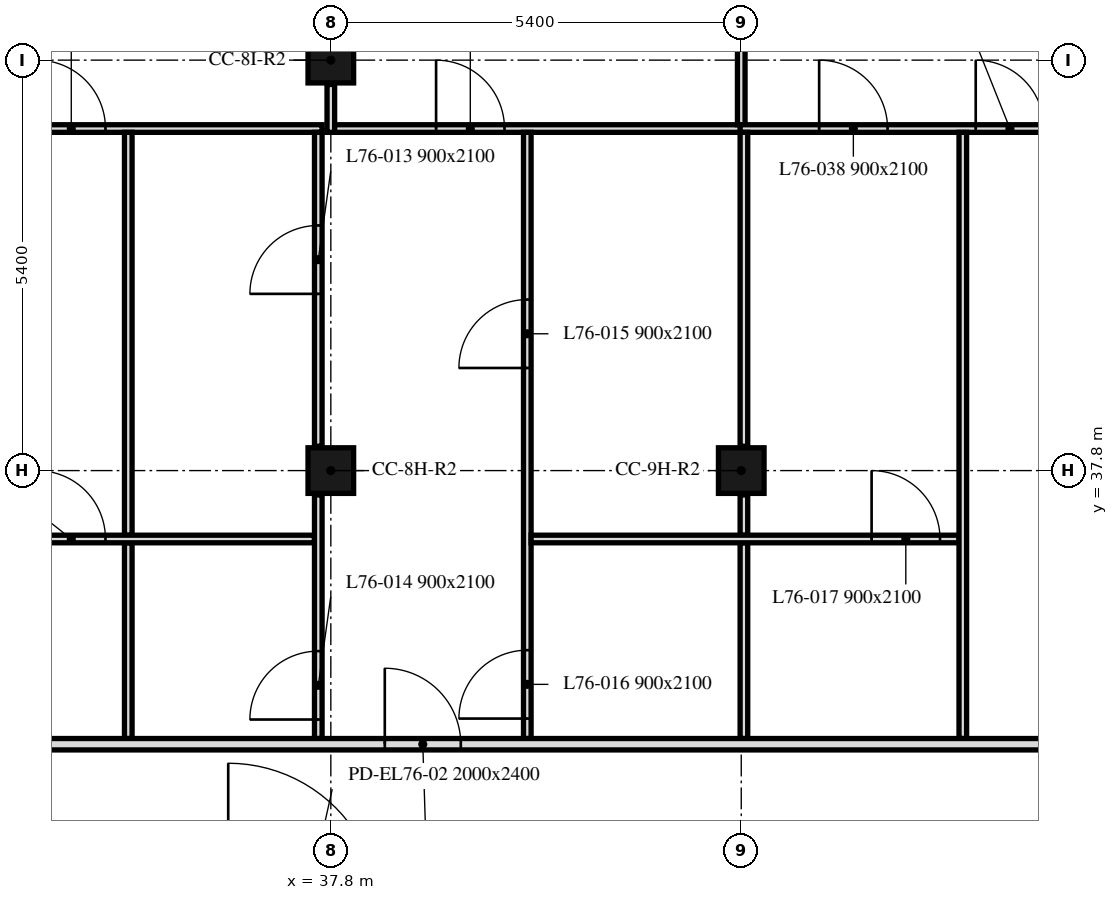
"""IFC4 building model, lengths in metres.
Left out: names, types, materials, properties, quantities, classifications, styles, units other than length and angle.
Written with IfcOpenShell. Run it as: python <this file> out.ifc"""

import sys

from ifc_helpers import new_model, si_unit, direction, frame, frame_2d, origin, origin_2d, place, context, subcontext, project, spatial, rectangle, extrude, element, fill, save


model = new_model("IFC4")
c1 = context("Model", 3, precision=1e-05, world=origin(), true_north=direction((0.0, 1.0)))
c2 = subcontext(c1, "Body", "Model", "MODEL_VIEW")
j1 = project(units=[si_unit("LENGTHUNIT", "METRE"), si_unit("PLANEANGLEUNIT", "RADIAN")], contexts=[c1])
p1 = place(None, origin())
s1 = spatial("IfcSite", under=j1, at=p1, CompositionType="ELEMENT")
p2 = place(p1, origin())
s2 = spatial("IfcBuilding", under=s1, at=p2, CompositionType="ELEMENT")
p3 = place(p2, frame((0.0, 0.0, 304.9)))
s3 = spatial("IfcBuildingStorey", under=s2, at=p3, CompositionType="ELEMENT", Elevation=304.9)
for number, where, z_axis, x_axis in (
    (1, (37.8, 37.8, 0.0), (0.0, 0.0, 1.0), (1.0, 0.0, 0.0)),
    (2, (43.2, 37.8, 0.0), (0.0, 0.0, 1.0), (1.0, 0.0, 0.0)),
    (3, (37.8, 43.2, 0.0), (0.0, 0.0, 1.0), (1.0, 0.0, 0.0)),
):
    element("IfcColumn", number, at=place(p3, frame(where, z_axis=z_axis, x_axis=x_axis)), inside=s3, PredefinedType="COLUMN", context=c2, shape_type="SweptSolid", body=[
        extrude(rectangle(XDim=0.6, YDim=0.6, at=origin_2d()), origin(), (0.0, 0.0, 1.0), 2.8),
    ])
p4 = place(p3, frame((47.901, 43.051, 0.0), z_axis=(0.0, 0.0, 1.0), x_axis=(-0.707106781187, 0.707106781187, 0.0)))
e4 = element("IfcWall", 4, at=p4, inside=s3, PredefinedType="SOLIDWALL", context=c2, shape_type="SweptSolid", body=[
    extrude(rectangle(XDim=6.86, YDim=0.3, at=frame_2d((3.43, 0.0))), origin(), (0.0, 0.0, 1.0), 2.8),
])
p5 = place(p4, frame((1.28, 0.0, 0.9)))
e5 = element("IfcOpeningElement", 5, at=p5, cuts=e4, PredefinedType="OPENING", context=c2, shape_type="SweptSolid", body=[
    extrude(rectangle(XDim=1.1, YDim=1.7, at=frame_2d((0.55, 0.85))), frame((0.0, 0.16, 0.0), z_axis=(0.0, -1.0, 0.0), x_axis=(1.0, 0.0, 0.0)), (0.0, 0.0, 1.0), 0.32),
])
p6 = place(p4, frame((4.48, 0.0, 0.9)))
e6 = element("IfcOpeningElement", 6, at=p6, cuts=e4, PredefinedType="OPENING", context=c2, shape_type="SweptSolid", body=[
    extrude(rectangle(XDim=1.1, YDim=1.7, at=frame_2d((0.55, 0.85))), frame((0.0, 0.16, 0.0), z_axis=(0.0, -1.0, 0.0), x_axis=(1.0, 0.0, 0.0)), (0.0, 0.0, 1.0), 0.32),
])
p7 = place(p3, frame((32.475, 42.3, 0.0), z_axis=(0.0, 0.0, 1.0), x_axis=(1.0, 0.0, 0.0)))
e7 = element("IfcWall", 7, at=p7, inside=s3, PredefinedType="PARTITIONING", context=c2, shape_type="SweptSolid", body=[
    extrude(rectangle(XDim=5.21, YDim=0.1, at=frame_2d((2.605, 0.0))), origin(), (0.0, 0.0, 1.0), 2.8),
])
p8 = place(p7, frame((1.46, 0.0, 0.0)))
e8 = element("IfcOpeningElement", 8, at=p8, cuts=e7, PredefinedType="OPENING", context=c2, shape_type="SweptSolid", body=[
    extrude(rectangle(XDim=0.9, YDim=2.1, at=frame_2d((0.45, 1.05))), frame((0.0, 0.05, 0.0), z_axis=(0.0, -1.0, 0.0), x_axis=(1.0, 0.0, 0.0)), (0.0, 0.0, 1.0), 0.1),
])
p9 = place(p3, frame((37.8, 42.25, 0.0), z_axis=(0.0, 0.0, 1.0), x_axis=(0.0, 1.0, 0.0)))
e9 = element("IfcWall", 9, at=p9, inside=s3, PredefinedType="PARTITIONING", context=c2, shape_type="SweptSolid", body=[
    extrude(rectangle(XDim=0.63, YDim=0.1, at=frame_2d((0.315, 0.0))), origin(), (0.0, 0.0, 1.0), 2.8),
])
p10 = place(p3, frame((37.85, 42.3, 0.0), z_axis=(0.0, 0.0, 1.0), x_axis=(1.0, 0.0, 0.0)))
e10 = element("IfcWall", 10, at=p10, inside=s3, PredefinedType="PARTITIONING", context=c2, shape_type="SweptSolid", body=[
    extrude(rectangle(XDim=5.4, YDim=0.1, at=frame_2d((2.7, 0.0))), origin(), (0.0, 0.0, 1.0), 2.8),
])
p11 = place(p10, frame((1.335, 0.0, 0.0)))
e11 = element("IfcOpeningElement", 11, at=p11, cuts=e10, PredefinedType="OPENING", context=c2, shape_type="SweptSolid", body=[
    extrude(rectangle(XDim=0.9, YDim=2.1, at=frame_2d((0.45, 1.05))), frame((0.0, 0.05, 0.0), z_axis=(0.0, -1.0, 0.0), x_axis=(1.0, 0.0, 0.0)), (0.0, 0.0, 1.0), 0.1),
])
p12 = place(p3, frame((43.2, 42.35, 0.0), z_axis=(0.0, 0.0, 1.0), x_axis=(0.0, 1.0, 0.0)))
e12 = element("IfcWall", 12, at=p12, inside=s3, PredefinedType="PARTITIONING", context=c2, shape_type="SweptSolid", body=[
    extrude(rectangle(XDim=5.138, YDim=0.1, at=frame_2d((2.569, 0.0))), origin(), (0.0, 0.0, 1.0), 2.8),
])
p13 = place(p12, frame((2.65, 0.0, 0.0)))
e13 = element("IfcOpeningElement", 13, at=p13, cuts=e12, PredefinedType="OPENING", context=c2, shape_type="SweptSolid", body=[
    extrude(rectangle(XDim=0.9, YDim=2.1, at=frame_2d((0.45, 1.05))), frame((0.0, 0.05, 0.0), z_axis=(0.0, -1.0, 0.0), x_axis=(1.0, 0.0, 0.0)), (0.0, 0.0, 1.0), 0.1),
])
p14 = place(p3, frame((43.185, 42.3, 0.0), z_axis=(0.0, 0.0, 1.0), x_axis=(1.0, 0.0, 0.0)))
e14 = element("IfcWall", 14, at=p14, inside=s3, PredefinedType="PARTITIONING", context=c2, shape_type="SweptSolid", body=[
    extrude(rectangle(XDim=4.664, YDim=0.1, at=frame_2d((2.332, 0.0))), origin(), (0.0, 0.0, 1.0), 2.8),
])
p15 = place(p14, frame((3.1, 0.0, 0.0)))
e15 = element("IfcOpeningElement", 15, at=p15, cuts=e14, PredefinedType="OPENING", context=c2, shape_type="SweptSolid", body=[
    extrude(rectangle(XDim=0.9, YDim=2.1, at=frame_2d((0.45, 1.05))), frame((0.0, 0.05, 0.0), z_axis=(0.0, -1.0, 0.0), x_axis=(1.0, 0.0, 0.0)), (0.0, 0.0, 1.0), 0.1),
])
p16 = place(p14, frame((1.04, 0.0, 0.0)))
e16 = element("IfcOpeningElement", 16, at=p16, cuts=e14, PredefinedType="OPENING", context=c2, shape_type="SweptSolid", body=[
    extrude(rectangle(XDim=0.9, YDim=2.1, at=frame_2d((0.45, 1.05))), frame((0.0, 0.05, 0.0), z_axis=(0.0, -1.0, 0.0), x_axis=(1.0, 0.0, 0.0)), (0.0, 0.0, 1.0), 0.1),
])
p17 = place(p3, frame((35.135, 36.95, 0.0), z_axis=(0.0, 0.0, 1.0), x_axis=(0.0, 1.0, 0.0)))
e17 = element("IfcWall", 17, at=p17, inside=s3, PredefinedType="PARTITIONING", context=c2, shape_type="SweptSolid", body=[
    extrude(rectangle(XDim=5.3, YDim=0.1, at=frame_2d((2.65, 0.0))), origin(), (0.0, 0.0, 1.0), 2.2),
])
p18 = place(p3, frame((35.135, 34.275, 0.0), z_axis=(0.0, 0.0, 1.0), x_axis=(0.0, 1.0, 0.0)))
e18 = element("IfcWall", 18, at=p18, inside=s3, PredefinedType="PARTITIONING", context=c2, shape_type="SweptSolid", body=[
    extrude(rectangle(XDim=2.575, YDim=0.1, at=frame_2d((1.288, 0.0))), origin(), (0.0, 0.0, 1.0), 2.8),
])
p19 = place(p3, frame((32.475, 36.9, 0.0), z_axis=(0.0, 0.0, 1.0), x_axis=(1.0, 0.0, 0.0)))
e19 = element("IfcWall", 19, at=p19, inside=s3, PredefinedType="PARTITIONING", context=c2, shape_type="SweptSolid", body=[
    extrude(rectangle(XDim=5.11, YDim=0.1, at=frame_2d((2.555, 0.0))), origin(), (0.0, 0.0, 1.0), 2.8),
])
p20 = place(p19, frame((1.46, 0.0, 0.0)))
e20 = element("IfcOpeningElement", 20, at=p20, cuts=e19, PredefinedType="OPENING", context=c2, shape_type="SweptSolid", body=[
    extrude(rectangle(XDim=0.9, YDim=2.1, at=frame_2d((0.45, 1.05))), frame((0.0, 0.05, 0.0), z_axis=(0.0, -1.0, 0.0), x_axis=(1.0, 0.0, 0.0)), (0.0, 0.0, 1.0), 0.1),
])
p21 = place(p3, frame((37.635, 38.12, 0.0), z_axis=(0.0, 0.0, 1.0), x_axis=(0.0, 1.0, 0.0)))
e21 = element("IfcWall", 21, at=p21, inside=s3, PredefinedType="PARTITIONING", context=c2, shape_type="SweptSolid", body=[
    extrude(rectangle(XDim=4.13, YDim=0.1, at=frame_2d((2.065, 0.0))), origin(), (0.0, 0.0, 1.0), 2.8),
])
p22 = place(p21, frame((2.005, 0.0, 0.0)))
e22 = element("IfcOpeningElement", 22, at=p22, cuts=e21, PredefinedType="OPENING", context=c2, shape_type="SweptSolid", body=[
    extrude(rectangle(XDim=0.9, YDim=2.1, at=frame_2d((0.45, 1.05))), frame((0.0, 0.05, 0.0), z_axis=(0.0, -1.0, 0.0), x_axis=(1.0, 0.0, 0.0)), (0.0, 0.0, 1.0), 0.1),
])
p23 = place(p3, frame((37.635, 34.275, 0.0), z_axis=(0.0, 0.0, 1.0), x_axis=(0.0, 1.0, 0.0)))
e23 = element("IfcWall", 23, at=p23, inside=s3, PredefinedType="PARTITIONING", context=c2, shape_type="SweptSolid", body=[
    extrude(rectangle(XDim=3.205, YDim=0.1, at=frame_2d((1.603, 0.0))), origin(), (0.0, 0.0, 1.0), 2.8),
])
p24 = place(p23, frame((0.25, 0.0, 0.0)))
e24 = element("IfcOpeningElement", 24, at=p24, cuts=e23, PredefinedType="OPENING", context=c2, shape_type="SweptSolid", body=[
    extrude(rectangle(XDim=0.9, YDim=2.1, at=frame_2d((0.45, 1.05))), frame((0.0, 0.05, 0.0), z_axis=(0.0, -1.0, 0.0), x_axis=(1.0, 0.0, 0.0)), (0.0, 0.0, 1.0), 0.1),
])
p25 = place(p3, frame((40.385, 34.275, 0.0), z_axis=(0.0, 0.0, 1.0), x_axis=(0.0, 1.0, 0.0)))
e25 = element("IfcWall", 25, at=p25, inside=s3, PredefinedType="PARTITIONING", context=c2, shape_type="SweptSolid", body=[
    extrude(rectangle(XDim=7.975, YDim=0.1, at=frame_2d((3.988, 0.0))), origin(), (0.0, 0.0, 1.0), 2.2),
])
p26 = place(p25, frame((4.875, 0.0, 0.0)))
e26 = element("IfcOpeningElement", 26, at=p26, cuts=e25, PredefinedType="OPENING", context=c2, shape_type="SweptSolid", body=[
    extrude(rectangle(XDim=0.9, YDim=2.1, at=frame_2d((0.45, 1.05))), frame((0.0, 0.05, 0.0), z_axis=(0.0, -1.0, 0.0), x_axis=(1.0, 0.0, 0.0)), (0.0, 0.0, 1.0), 0.1),
])
p27 = place(p25, frame((0.262, 0.0, 0.0)))
e27 = element("IfcOpeningElement", 27, at=p27, cuts=e25, PredefinedType="OPENING", context=c2, shape_type="SweptSolid", body=[
    extrude(rectangle(XDim=0.9, YDim=2.1, at=frame_2d((0.45, 1.05))), frame((0.0, 0.05, 0.0), z_axis=(0.0, -1.0, 0.0), x_axis=(1.0, 0.0, 0.0)), (0.0, 0.0, 1.0), 0.1),
])
p28 = place(p3, frame((43.235, 36.95, 0.0), z_axis=(0.0, 0.0, 1.0), x_axis=(0.0, 1.0, 0.0)))
e28 = element("IfcWall", 28, at=p28, inside=s3, PredefinedType="PARTITIONING", context=c2, shape_type="SweptSolid", body=[
    extrude(rectangle(XDim=0.53, YDim=0.1, at=frame_2d((0.265, 0.0))), origin(), (0.0, 0.0, 1.0), 2.8),
])
p29 = place(p3, frame((43.235, 38.12, 0.0), z_axis=(0.0, 0.0, 1.0), x_axis=(0.0, 1.0, 0.0)))
e29 = element("IfcWall", 29, at=p29, inside=s3, PredefinedType="PARTITIONING", context=c2, shape_type="SweptSolid", body=[
    extrude(rectangle(XDim=4.13, YDim=0.1, at=frame_2d((2.065, 0.0))), origin(), (0.0, 0.0, 1.0), 2.8),
])
p30 = place(p3, frame((43.235, 34.275, 0.0), z_axis=(0.0, 0.0, 1.0), x_axis=(0.0, 1.0, 0.0)))
e30 = element("IfcWall", 30, at=p30, inside=s3, PredefinedType="PARTITIONING", context=c2, shape_type="SweptSolid", body=[
    extrude(rectangle(XDim=2.575, YDim=0.1, at=frame_2d((1.288, 0.0))), origin(), (0.0, 0.0, 1.0), 2.8),
])
p31 = place(p3, frame((40.435, 36.9, 0.0), z_axis=(0.0, 0.0, 1.0), x_axis=(1.0, 0.0, 0.0)))
e31 = element("IfcWall", 31, at=p31, inside=s3, PredefinedType="PARTITIONING", context=c2, shape_type="SweptSolid", body=[
    extrude(rectangle(XDim=5.63, YDim=0.1, at=frame_2d((2.815, 0.0))), origin(), (0.0, 0.0, 1.0), 2.8),
])
p32 = place(p31, frame((4.48, 0.0, 0.0)))
e32 = element("IfcOpeningElement", 32, at=p32, cuts=e31, PredefinedType="OPENING", context=c2, shape_type="SweptSolid", body=[
    extrude(rectangle(XDim=0.9, YDim=2.1, at=frame_2d((0.45, 1.05))), frame((0.0, 0.05, 0.0), z_axis=(0.0, -1.0, 0.0), x_axis=(1.0, 0.0, 0.0)), (0.0, 0.0, 1.0), 0.1),
])
p33 = place(p3, frame((46.115, 34.275, 0.0), z_axis=(0.0, 0.0, 1.0), x_axis=(0.0, 1.0, 0.0)))
e33 = element("IfcWall", 33, at=p33, inside=s3, PredefinedType="PARTITIONING", context=c2, shape_type="SweptSolid", body=[
    extrude(rectangle(XDim=7.975, YDim=0.1, at=frame_2d((3.988, 0.0))), origin(), (0.0, 0.0, 1.0), 2.2),
])
p34 = place(p3, frame((6.151, 34.2, 0.0), z_axis=(0.0, 0.0, 1.0), x_axis=(1.0, 0.0, 0.0)))
e34 = element("IfcWall", 34, at=p34, inside=s3, PredefinedType="PARTITIONING", context=c2, shape_type="SweptSolid", body=[
    extrude(rectangle(XDim=41.698, YDim=0.15, at=frame_2d((20.849, 0.0))), origin(), (0.0, 0.0, 1.0), 2.2),
])
p35 = place(p34, frame((2.939, 0.0, 0.0)))
e35 = element("IfcOpeningElement", 35, at=p35, cuts=e34, PredefinedType="OPENING", context=c2, shape_type="SweptSolid", body=[
    extrude(rectangle(XDim=1.0, YDim=2.1, at=frame_2d((0.5, 1.05))), frame((0.0, 0.075, 0.0), z_axis=(0.0, -1.0, 0.0), x_axis=(1.0, 0.0, 0.0)), (0.0, 0.0, 1.0), 0.15),
])
p36 = place(p34, frame((18.121, 0.0, 0.0)))
e36 = element("IfcOpeningElement", 36, at=p36, cuts=e34, PredefinedType="OPENING", context=c2, shape_type="SweptSolid", body=[
    extrude(rectangle(XDim=1.0, YDim=2.1, at=frame_2d((0.5, 1.05))), frame((0.0, 0.075, 0.0), z_axis=(0.0, -1.0, 0.0), x_axis=(1.0, 0.0, 0.0)), (0.0, 0.0, 1.0), 0.15),
])
p37 = place(p34, frame((32.359, 0.0, 0.0)))
e37 = element("IfcOpeningElement", 37, at=p37, cuts=e34, PredefinedType="OPENING", context=c2, shape_type="SweptSolid", body=[
    extrude(rectangle(XDim=1.0, YDim=2.1, at=frame_2d((0.5, 1.05))), frame((0.0, 0.075, 0.0), z_axis=(0.0, -1.0, 0.0), x_axis=(1.0, 0.0, 0.0)), (0.0, 0.0, 1.0), 0.15),
])
p38 = place(p15, origin())
e38 = element("IfcDoor", 38, at=p38, inside=s3, OperationType="SINGLE_SWING_RIGHT", PredefinedType="DOOR", context=c2, shape_type="SweptSolid", body=[
    extrude(rectangle(XDim=0.9, YDim=2.1, at=frame_2d((0.45, 1.05))), frame((0.0, 0.025, 0.0), z_axis=(0.0, -1.0, 0.0), x_axis=(1.0, 0.0, 0.0)), (0.0, 0.0, 1.0), 0.05),
])
fill(e15, e38)
p39 = place(p20, origin())
e39 = element("IfcDoor", 39, at=p39, inside=s3, OperationType="SINGLE_SWING_LEFT", PredefinedType="DOOR", context=c2, shape_type="SweptSolid", body=[
    extrude(rectangle(XDim=0.9, YDim=2.1, at=frame_2d((0.45, 1.05))), frame((0.0, 0.025, 0.0), z_axis=(0.0, -1.0, 0.0), x_axis=(1.0, 0.0, 0.0)), (0.0, 0.0, 1.0), 0.05),
])
fill(e20, e39)
p40 = place(p22, origin())
e40 = element("IfcDoor", 40, at=p40, inside=s3, OperationType="SINGLE_SWING_RIGHT", PredefinedType="DOOR", context=c2, shape_type="SweptSolid", body=[
    extrude(rectangle(XDim=0.9, YDim=2.1, at=frame_2d((0.45, 1.05))), frame((0.0, 0.025, 0.0), z_axis=(0.0, -1.0, 0.0), x_axis=(1.0, 0.0, 0.0)), (0.0, 0.0, 1.0), 0.05),
])
fill(e22, e40)
p41 = place(p24, origin())
e41 = element("IfcDoor", 41, at=p41, inside=s3, OperationType="SINGLE_SWING_LEFT", PredefinedType="DOOR", context=c2, shape_type="SweptSolid", body=[
    extrude(rectangle(XDim=0.9, YDim=2.1, at=frame_2d((0.45, 1.05))), frame((0.0, 0.025, 0.0), z_axis=(0.0, -1.0, 0.0), x_axis=(1.0, 0.0, 0.0)), (0.0, 0.0, 1.0), 0.05),
])
fill(e24, e41)
p42 = place(p26, origin())
e42 = element("IfcDoor", 42, at=p42, inside=s3, OperationType="SINGLE_SWING_LEFT", PredefinedType="DOOR", context=c2, shape_type="SweptSolid", body=[
    extrude(rectangle(XDim=0.9, YDim=2.1, at=frame_2d((0.45, 1.05))), frame((0.0, 0.025, 0.0), z_axis=(0.0, -1.0, 0.0), x_axis=(1.0, 0.0, 0.0)), (0.0, 0.0, 1.0), 0.05),
])
fill(e26, e42)
p43 = place(p27, origin())
e43 = element("IfcDoor", 43, at=p43, inside=s3, OperationType="SINGLE_SWING_LEFT", PredefinedType="DOOR", context=c2, shape_type="SweptSolid", body=[
    extrude(rectangle(XDim=0.9, YDim=2.1, at=frame_2d((0.45, 1.05))), frame((0.0, 0.025, 0.0), z_axis=(0.0, -1.0, 0.0), x_axis=(1.0, 0.0, 0.0)), (0.0, 0.0, 1.0), 0.05),
])
fill(e27, e43)
p44 = place(p32, origin())
e44 = element("IfcDoor", 44, at=p44, inside=s3, OperationType="SINGLE_SWING_LEFT", PredefinedType="DOOR", context=c2, shape_type="SweptSolid", body=[
    extrude(rectangle(XDim=0.9, YDim=2.1, at=frame_2d((0.45, 1.05))), frame((0.0, 0.025, 0.0), z_axis=(0.0, -1.0, 0.0), x_axis=(1.0, 0.0, 0.0)), (0.0, 0.0, 1.0), 0.05),
])
fill(e32, e44)
p45 = place(p8, origin())
e45 = element("IfcDoor", 45, at=p45, inside=s3, OperationType="SINGLE_SWING_RIGHT", PredefinedType="DOOR", context=c2, shape_type="SweptSolid", body=[
    extrude(rectangle(XDim=0.9, YDim=2.1, at=frame_2d((0.45, 1.05))), frame((0.0, 0.025, 0.0), z_axis=(0.0, -1.0, 0.0), x_axis=(1.0, 0.0, 0.0)), (0.0, 0.0, 1.0), 0.05),
])
fill(e8, e45)
p46 = place(p16, origin())
e46 = element("IfcDoor", 46, at=p46, inside=s3, OperationType="SINGLE_SWING_LEFT", PredefinedType="DOOR", context=c2, shape_type="SweptSolid", body=[
    extrude(rectangle(XDim=0.9, YDim=2.1, at=frame_2d((0.45, 1.05))), frame((0.0, 0.025, 0.0), z_axis=(0.0, -1.0, 0.0), x_axis=(1.0, 0.0, 0.0)), (0.0, 0.0, 1.0), 0.05),
])
fill(e16, e46)
p47 = place(p11, origin())
e47 = element("IfcDoor", 47, at=p47, inside=s3, OperationType="SINGLE_SWING_RIGHT", PredefinedType="DOOR", context=c2, shape_type="SweptSolid", body=[
    extrude(rectangle(XDim=0.9, YDim=2.1, at=frame_2d((0.45, 1.05))), frame((0.0, 0.025, 0.0), z_axis=(0.0, -1.0, 0.0), x_axis=(1.0, 0.0, 0.0)), (0.0, 0.0, 1.0), 0.05),
])
fill(e11, e47)
p48 = place(p37, origin())
e48 = element("IfcDoor", 48, at=p48, inside=s3, OperationType="SINGLE_SWING_LEFT", PredefinedType="DOOR", context=c2, shape_type="SweptSolid", body=[
    extrude(rectangle(XDim=1.0, YDim=2.1, at=frame_2d((0.5, 1.05))), frame((0.0, 0.025, 0.0), z_axis=(0.0, -1.0, 0.0), x_axis=(1.0, 0.0, 0.0)), (0.0, 0.0, 1.0), 0.05),
])
fill(e37, e48)
save(model, sys.argv[1])
